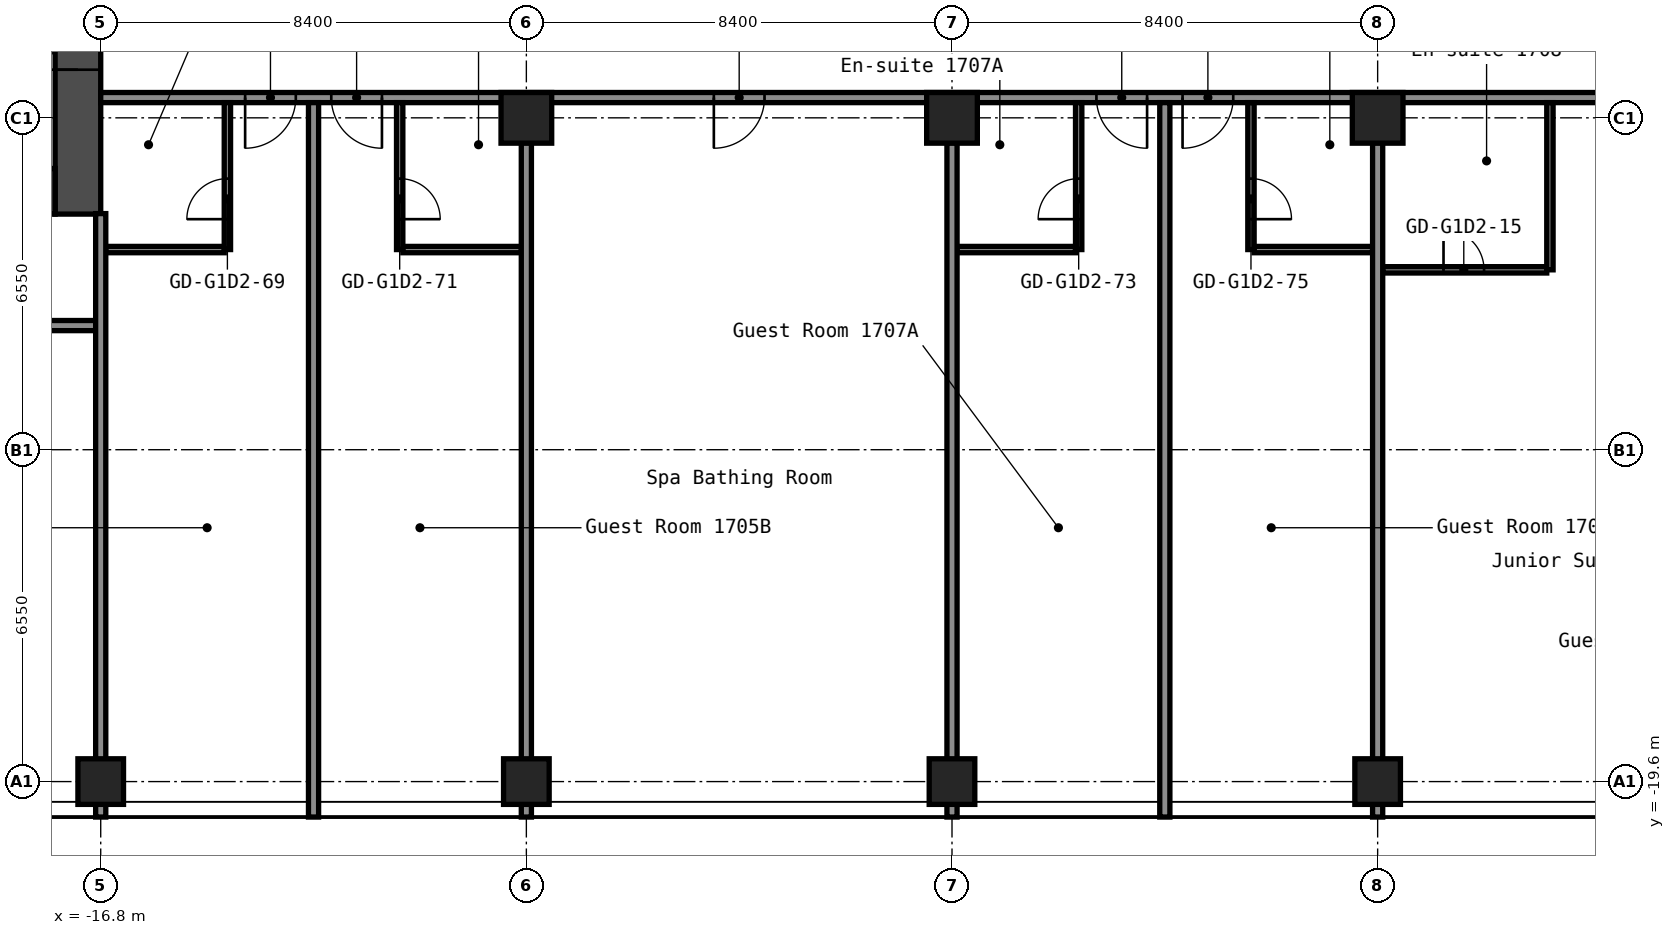
"""IFC4 building model, lengths in metres.
Left out: names, types, materials, properties, quantities, classifications, styles, units other than length and angle.
Written with IfcOpenShell. Run it as: python <this file> out.ifc"""

import sys

from ifc_helpers import new_model, si_unit, direction, frame, frame_2d, origin, origin_2d, place, context, subcontext, project, spatial, rectangle, hollow_rectangle, extrude, element, fill, save


model = new_model("IFC4")
c1 = context("Model", 3, precision=1e-05, world=origin(), true_north=direction((0.0, 1.0)))
c2 = subcontext(c1, "Body", "Model", "MODEL_VIEW")
j1 = project(units=[si_unit("LENGTHUNIT", "METRE"), si_unit("PLANEANGLEUNIT", "RADIAN")], contexts=[c1])
p1 = place(None, origin())
s1 = spatial("IfcSite", under=j1, at=p1, CompositionType="ELEMENT")
p2 = place(p1, origin())
s2 = spatial("IfcBuilding", under=s1, at=p2, CompositionType="ELEMENT")
p3 = place(p2, frame((0.0, 0.0, 61.4)))
s3 = spatial("IfcBuildingStorey", under=s2, at=p3, CompositionType="ELEMENT", Elevation=61.4)
for number, where, z_axis, x_axis in (
    (1, (-16.8, -19.6, 0.0), (0.0, 0.0, 1.0), (1.0, 0.0, 0.0)),
    (2, (-8.4, -19.6, 0.0), (0.0, 0.0, 1.0), (1.0, 0.0, 0.0)),
):
    element("IfcColumn", number, at=place(p3, frame(where, z_axis=z_axis, x_axis=x_axis)), inside=s3, PredefinedType="COLUMN", context=c2, shape_type="SweptSolid", body=[
        extrude(hollow_rectangle(XDim=0.9, YDim=0.9, WallThickness=0.036, at=origin_2d()), origin(), (0.0, 0.0, 1.0), 2.9),
    ])
p4 = place(p3, frame((-8.4, -6.5, 0.0), z_axis=(0.0, 0.0, 1.0), x_axis=(1.0, 0.0, 0.0)))
e3 = element("IfcColumn", 3, at=p4, inside=s3, PredefinedType="COLUMN", context=c2, shape_type="SweptSolid", body=[
    extrude(hollow_rectangle(XDim=1.0, YDim=1.0, WallThickness=0.04, at=origin_2d()), origin(), (0.0, 0.0, 1.0), 2.9),
])
p5 = place(p3, frame((0.0, -19.6, 0.0), z_axis=(0.0, 0.0, 1.0), x_axis=(1.0, 0.0, 0.0)))
e4 = element("IfcColumn", 4, at=p5, inside=s3, PredefinedType="COLUMN", context=c2, shape_type="SweptSolid", body=[
    extrude(hollow_rectangle(XDim=0.9, YDim=0.9, WallThickness=0.036, at=origin_2d()), origin(), (0.0, 0.0, 1.0), 2.9),
])
p6 = place(p3, frame((0.0, -6.5, 0.0), z_axis=(0.0, 0.0, 1.0), x_axis=(1.0, 0.0, 0.0)))
e5 = element("IfcColumn", 5, at=p6, inside=s3, PredefinedType="COLUMN", context=c2, shape_type="SweptSolid", body=[
    extrude(hollow_rectangle(XDim=1.0, YDim=1.0, WallThickness=0.04, at=origin_2d()), origin(), (0.0, 0.0, 1.0), 2.9),
])
p7 = place(p3, frame((8.4, -19.6, 0.0), z_axis=(0.0, 0.0, 1.0), x_axis=(1.0, 0.0, 0.0)))
e6 = element("IfcColumn", 6, at=p7, inside=s3, PredefinedType="COLUMN", context=c2, shape_type="SweptSolid", body=[
    extrude(hollow_rectangle(XDim=0.9, YDim=0.9, WallThickness=0.036, at=origin_2d()), origin(), (0.0, 0.0, 1.0), 2.9),
])
p8 = place(p3, frame((8.4, -6.5, 0.0), z_axis=(0.0, 0.0, 1.0), x_axis=(1.0, 0.0, 0.0)))
e7 = element("IfcColumn", 7, at=p8, inside=s3, PredefinedType="COLUMN", context=c2, shape_type="SweptSolid", body=[
    extrude(hollow_rectangle(XDim=1.0, YDim=1.0, WallThickness=0.04, at=origin_2d()), origin(), (0.0, 0.0, 1.0), 2.9),
])
p9 = place(p3, frame((-17.25, -8.4, 0.0), z_axis=(0.0, 0.0, 1.0), x_axis=(0.0, 1.0, 0.0)))
e8 = element("IfcWall", 8, at=p9, inside=s3, PredefinedType="SHEAR", context=c2, shape_type="SweptSolid", body=[
    extrude(rectangle(XDim=16.8, YDim=0.9, at=frame_2d((8.4, 0.0))), origin(), (0.0, 0.0, 1.0), 2.9),
])
p10 = place(p9, frame((12.75, 0.0, 0.0)))
e9 = element("IfcOpeningElement", 9, at=p10, cuts=e8, PredefinedType="OPENING", context=c2, shape_type="SweptSolid", body=[
    extrude(rectangle(XDim=1.2, YDim=2.1, at=frame_2d((0.6, 1.05))), frame((0.0, 0.46, 0.0), z_axis=(0.0, -1.0, 0.0), x_axis=(1.0, 0.0, 0.0)), (0.0, 0.0, 1.0), 0.92),
])
p11 = place(p9, frame((2.85, 0.0, 0.0)))
e10 = element("IfcOpeningElement", 10, at=p11, cuts=e8, PredefinedType="OPENING", context=c2, shape_type="SweptSolid", body=[
    extrude(rectangle(XDim=1.2, YDim=2.1, at=frame_2d((0.6, 1.05))), frame((0.0, 0.46, 0.0), z_axis=(0.0, -1.0, 0.0), x_axis=(1.0, 0.0, 0.0)), (0.0, 0.0, 1.0), 0.92),
])
p12 = place(p3, frame((-32.7, -7.95, 0.0), z_axis=(0.0, 0.0, 1.0), x_axis=(1.0, 0.0, 0.0)))
e11 = element("IfcWall", 11, at=p12, inside=s3, PredefinedType="SHEAR", context=c2, shape_type="SweptSolid", body=[
    extrude(rectangle(XDim=15.0, YDim=0.9, at=frame_2d((7.5, 0.0))), origin(), (0.0, 0.0, 1.0), 2.9),
])
p13 = place(p12, frame((11.45, 0.0, 0.0)))
e12 = element("IfcOpeningElement", 12, at=p13, cuts=e11, PredefinedType="OPENING", context=c2, shape_type="SweptSolid", body=[
    extrude(rectangle(XDim=1.0, YDim=2.1, at=frame_2d((0.5, 1.05))), frame((0.0, 0.46, 0.0), z_axis=(0.0, -1.0, 0.0), x_axis=(1.0, 0.0, 0.0)), (0.0, 0.0, 1.0), 0.92),
])
p14 = place(p3, frame((-51.1, -10.6, 0.0), z_axis=(0.0, 0.0, 1.0), x_axis=(1.0, 0.0, 0.0)))
e13 = element("IfcWall", 13, at=p14, inside=s3, PredefinedType="PARTITIONING", context=c2, shape_type="SweptSolid", body=[
    extrude(rectangle(XDim=34.3, YDim=0.2, at=frame_2d((17.15, 0.0))), origin(), (0.0, 0.0, 1.0), 2.9),
])
p15 = place(p14, frame((3.25, 0.0, 0.0)))
e14 = element("IfcOpeningElement", 14, at=p15, cuts=e13, PredefinedType="OPENING", context=c2, shape_type="SweptSolid", body=[
    extrude(rectangle(XDim=1.0, YDim=2.1, at=frame_2d((0.5, 1.05))), frame((0.0, 0.11, 0.0), z_axis=(0.0, -1.0, 0.0), x_axis=(1.0, 0.0, 0.0)), (0.0, 0.0, 1.0), 0.22),
])
p16 = place(p14, frame((5.15, 0.0, 0.0)))
e15 = element("IfcOpeningElement", 15, at=p16, cuts=e13, PredefinedType="OPENING", context=c2, shape_type="SweptSolid", body=[
    extrude(rectangle(XDim=1.0, YDim=2.1, at=frame_2d((0.5, 1.05))), frame((0.0, 0.11, 0.0), z_axis=(0.0, -1.0, 0.0), x_axis=(1.0, 0.0, 0.0)), (0.0, 0.0, 1.0), 0.22),
])
p17 = place(p14, frame((11.1, 0.0, 0.0)))
e16 = element("IfcOpeningElement", 16, at=p17, cuts=e13, PredefinedType="OPENING", context=c2, shape_type="SweptSolid", body=[
    extrude(rectangle(XDim=1.0, YDim=2.1, at=frame_2d((0.5, 1.05))), frame((0.0, 0.11, 0.0), z_axis=(0.0, -1.0, 0.0), x_axis=(1.0, 0.0, 0.0)), (0.0, 0.0, 1.0), 0.22),
])
p18 = place(p14, frame((20.35, 0.0, 0.0)))
e17 = element("IfcOpeningElement", 17, at=p18, cuts=e13, PredefinedType="OPENING", context=c2, shape_type="SweptSolid", body=[
    extrude(rectangle(XDim=1.0, YDim=2.1, at=frame_2d((0.5, 1.05))), frame((0.0, 0.11, 0.0), z_axis=(0.0, -1.0, 0.0), x_axis=(1.0, 0.0, 0.0)), (0.0, 0.0, 1.0), 0.22),
])
p19 = place(p14, frame((22.05, 0.0, 0.0)))
e18 = element("IfcOpeningElement", 18, at=p19, cuts=e13, PredefinedType="OPENING", context=c2, shape_type="SweptSolid", body=[
    extrude(rectangle(XDim=1.0, YDim=2.1, at=frame_2d((0.5, 1.05))), frame((0.0, 0.11, 0.0), z_axis=(0.0, -1.0, 0.0), x_axis=(1.0, 0.0, 0.0)), (0.0, 0.0, 1.0), 0.22),
])
p20 = place(p14, frame((31.3, 0.0, 0.0)))
e19 = element("IfcOpeningElement", 19, at=p20, cuts=e13, PredefinedType="OPENING", context=c2, shape_type="SweptSolid", body=[
    extrude(rectangle(XDim=1.0, YDim=2.1, at=frame_2d((0.5, 1.05))), frame((0.0, 0.11, 0.0), z_axis=(0.0, -1.0, 0.0), x_axis=(1.0, 0.0, 0.0)), (0.0, 0.0, 1.0), 0.22),
])
p21 = place(p3, frame((8.5, -9.5, 0.0), z_axis=(0.0, 0.0, 1.0), x_axis=(1.0, 0.0, 0.0)))
e20 = element("IfcWall", 20, at=p21, inside=s3, PredefinedType="PARTITIONING", context=c2, shape_type="SweptSolid", body=[
    extrude(rectangle(XDim=3.238, YDim=0.125, at=frame_2d((1.619, 0.0))), origin(), (0.0, 0.0, 1.0), 2.9),
])
p22 = place(p21, frame((1.2, 0.0, 0.0)))
e21 = element("IfcOpeningElement", 21, at=p22, cuts=e20, PredefinedType="OPENING", context=c2, shape_type="SweptSolid", body=[
    extrude(rectangle(XDim=0.8, YDim=2.1, at=frame_2d((0.4, 1.05))), frame((0.0, 0.073, 0.0), z_axis=(0.0, -1.0, 0.0), x_axis=(1.0, 0.0, 0.0)), (0.0, 0.0, 1.0), 0.145),
])
for number, where, z_axis, x_axis in (
    (22, (-16.7, -9.1, 0.0), (0.0, 0.0, 1.0), (1.0, 0.0, 0.0)),
    (23, (-10.837, -9.1, 0.0), (0.0, 0.0, 1.0), (1.0, 0.0, 0.0)),
    (24, (0.1, -9.1, 0.0), (0.0, 0.0, 1.0), (1.0, 0.0, 0.0)),
):
    element("IfcWall", number, at=place(p3, frame(where, z_axis=z_axis, x_axis=x_axis)), inside=s3, PredefinedType="PARTITIONING", context=c2, shape_type="SweptSolid", body=[
        extrude(rectangle(XDim=2.337, YDim=0.125, at=frame_2d((1.169, 0.0))), origin(), (0.0, 0.0, 1.0), 2.9),
    ])
p23 = place(p3, frame((5.962, -9.1, 0.0), z_axis=(0.0, 0.0, 1.0), x_axis=(1.0, 0.0, 0.0)))
e25 = element("IfcWall", 25, at=p23, inside=s3, PredefinedType="PARTITIONING", context=c2, shape_type="SweptSolid", body=[
    extrude(rectangle(XDim=2.338, YDim=0.125, at=frame_2d((1.169, 0.0))), origin(), (0.0, 0.0, 1.0), 2.9),
])
p24 = place(p3, frame((-16.8, -6.1, 0.0), z_axis=(0.0, 0.0, 1.0), x_axis=(1.0, 0.0, 0.0)))
e26 = element("IfcWall", 26, at=p24, inside=s3, PredefinedType="PARTITIONING", context=c2, shape_type="SweptSolid", body=[
    extrude(rectangle(XDim=33.6, YDim=0.2, at=frame_2d((16.8, 0.0))), origin(), (0.0, 0.0, 1.0), 2.9),
])
p25 = place(p24, frame((2.85, 0.0, 0.0)))
e27 = element("IfcOpeningElement", 27, at=p25, cuts=e26, PredefinedType="OPENING", context=c2, shape_type="SweptSolid", body=[
    extrude(rectangle(XDim=1.0, YDim=2.1, at=frame_2d((0.5, 1.05))), frame((0.0, 0.11, 0.0), z_axis=(0.0, -1.0, 0.0), x_axis=(1.0, 0.0, 0.0)), (0.0, 0.0, 1.0), 0.22),
])
p26 = place(p24, frame((4.55, 0.0, 0.0)))
e28 = element("IfcOpeningElement", 28, at=p26, cuts=e26, PredefinedType="OPENING", context=c2, shape_type="SweptSolid", body=[
    extrude(rectangle(XDim=1.0, YDim=2.1, at=frame_2d((0.5, 1.05))), frame((0.0, 0.11, 0.0), z_axis=(0.0, -1.0, 0.0), x_axis=(1.0, 0.0, 0.0)), (0.0, 0.0, 1.0), 0.22),
])
p27 = place(p24, frame((12.1, 0.0, 0.0)))
e29 = element("IfcOpeningElement", 29, at=p27, cuts=e26, PredefinedType="OPENING", context=c2, shape_type="SweptSolid", body=[
    extrude(rectangle(XDim=1.0, YDim=2.1, at=frame_2d((0.5, 1.05))), frame((0.0, 0.11, 0.0), z_axis=(0.0, -1.0, 0.0), x_axis=(1.0, 0.0, 0.0)), (0.0, 0.0, 1.0), 0.22),
])
p28 = place(p24, frame((19.65, 0.0, 0.0)))
e30 = element("IfcOpeningElement", 30, at=p28, cuts=e26, PredefinedType="OPENING", context=c2, shape_type="SweptSolid", body=[
    extrude(rectangle(XDim=1.0, YDim=2.1, at=frame_2d((0.5, 1.05))), frame((0.0, 0.11, 0.0), z_axis=(0.0, -1.0, 0.0), x_axis=(1.0, 0.0, 0.0)), (0.0, 0.0, 1.0), 0.22),
])
p29 = place(p24, frame((21.35, 0.0, 0.0)))
e31 = element("IfcOpeningElement", 31, at=p29, cuts=e26, PredefinedType="OPENING", context=c2, shape_type="SweptSolid", body=[
    extrude(rectangle(XDim=1.0, YDim=2.1, at=frame_2d((0.5, 1.05))), frame((0.0, 0.11, 0.0), z_axis=(0.0, -1.0, 0.0), x_axis=(1.0, 0.0, 0.0)), (0.0, 0.0, 1.0), 0.22),
])
p30 = place(p24, frame((30.6, 0.0, 0.0)))
e32 = element("IfcOpeningElement", 32, at=p30, cuts=e26, PredefinedType="OPENING", context=c2, shape_type="SweptSolid", body=[
    extrude(rectangle(XDim=1.0, YDim=2.1, at=frame_2d((0.5, 1.05))), frame((0.0, 0.11, 0.0), z_axis=(0.0, -1.0, 0.0), x_axis=(1.0, 0.0, 0.0)), (0.0, 0.0, 1.0), 0.22),
])
p31 = place(p3, frame((-16.8, -20.3, 0.0), z_axis=(0.0, 0.0, 1.0), x_axis=(0.0, 1.0, 0.0)))
e33 = element("IfcWall", 33, at=p31, inside=s3, PredefinedType="PARTITIONING", context=c2, shape_type="SweptSolid", body=[
    extrude(rectangle(XDim=11.91, YDim=0.2, at=frame_2d((5.955, 0.0))), origin(), (0.0, 0.0, 1.0), 2.9),
])
p32 = place(p3, frame((-14.3, -9.1, 0.0), z_axis=(0.0, 0.0, 1.0), x_axis=(0.0, 1.0, 0.0)))
e34 = element("IfcWall", 34, at=p32, inside=s3, PredefinedType="PARTITIONING", context=c2, shape_type="SweptSolid", body=[
    extrude(rectangle(XDim=2.9, YDim=0.125, at=frame_2d((1.45, 0.0))), origin(), (0.0, 0.0, 1.0), 2.9),
])
p33 = place(p32, frame((0.6, 0.0, 0.0)))
e35 = element("IfcOpeningElement", 35, at=p33, cuts=e34, PredefinedType="OPENING", context=c2, shape_type="SweptSolid", body=[
    extrude(rectangle(XDim=0.8, YDim=2.1, at=frame_2d((0.4, 1.05))), frame((0.0, 0.073, 0.0), z_axis=(0.0, -1.0, 0.0), x_axis=(1.0, 0.0, 0.0)), (0.0, 0.0, 1.0), 0.145),
])
p34 = place(p3, frame((-12.6, -20.3, 0.0), z_axis=(0.0, 0.0, 1.0), x_axis=(0.0, 1.0, 0.0)))
e36 = element("IfcWall", 36, at=p34, inside=s3, PredefinedType="PARTITIONING", context=c2, shape_type="SweptSolid", body=[
    extrude(rectangle(XDim=14.1, YDim=0.2, at=frame_2d((7.05, 0.0))), origin(), (0.0, 0.0, 1.0), 2.9),
])
p35 = place(p3, frame((-10.9, -9.1, 0.0), z_axis=(0.0, 0.0, 1.0), x_axis=(0.0, 1.0, 0.0)))
e37 = element("IfcWall", 37, at=p35, inside=s3, PredefinedType="PARTITIONING", context=c2, shape_type="SweptSolid", body=[
    extrude(rectangle(XDim=2.9, YDim=0.125, at=frame_2d((1.45, 0.0))), origin(), (0.0, 0.0, 1.0), 2.9),
])
p36 = place(p35, frame((0.6, 0.0, 0.0)))
e38 = element("IfcOpeningElement", 38, at=p36, cuts=e37, PredefinedType="OPENING", context=c2, shape_type="SweptSolid", body=[
    extrude(rectangle(XDim=0.8, YDim=2.1, at=frame_2d((0.4, 1.05))), frame((0.0, 0.073, 0.0), z_axis=(0.0, -1.0, 0.0), x_axis=(1.0, 0.0, 0.0)), (0.0, 0.0, 1.0), 0.145),
])
for number, where, z_axis, x_axis in (
    (39, (-8.4, -20.3, 0.0), (0.0, 0.0, 1.0), (0.0, 1.0, 0.0)),
    (40, (0.0, -20.3, 0.0), (0.0, 0.0, 1.0), (0.0, 1.0, 0.0)),
):
    element("IfcWall", number, at=place(p3, frame(where, z_axis=z_axis, x_axis=x_axis)), inside=s3, PredefinedType="PARTITIONING", context=c2, shape_type="SweptSolid", body=[
        extrude(rectangle(XDim=13.31, YDim=0.2, at=frame_2d((6.655, 0.0))), origin(), (0.0, 0.0, 1.0), 2.9),
    ])
p37 = place(p3, frame((2.5, -9.1, 0.0), z_axis=(0.0, 0.0, 1.0), x_axis=(0.0, 1.0, 0.0)))
e41 = element("IfcWall", 41, at=p37, inside=s3, PredefinedType="PARTITIONING", context=c2, shape_type="SweptSolid", body=[
    extrude(rectangle(XDim=2.9, YDim=0.125, at=frame_2d((1.45, 0.0))), origin(), (0.0, 0.0, 1.0), 2.9),
])
p38 = place(p37, frame((0.6, 0.0, 0.0)))
e42 = element("IfcOpeningElement", 42, at=p38, cuts=e41, PredefinedType="OPENING", context=c2, shape_type="SweptSolid", body=[
    extrude(rectangle(XDim=0.8, YDim=2.1, at=frame_2d((0.4, 1.05))), frame((0.0, 0.073, 0.0), z_axis=(0.0, -1.0, 0.0), x_axis=(1.0, 0.0, 0.0)), (0.0, 0.0, 1.0), 0.145),
])
p39 = place(p3, frame((4.2, -20.3, 0.0), z_axis=(0.0, 0.0, 1.0), x_axis=(0.0, 1.0, 0.0)))
e43 = element("IfcWall", 43, at=p39, inside=s3, PredefinedType="PARTITIONING", context=c2, shape_type="SweptSolid", body=[
    extrude(rectangle(XDim=14.1, YDim=0.2, at=frame_2d((7.05, 0.0))), origin(), (0.0, 0.0, 1.0), 2.9),
])
p40 = place(p3, frame((5.9, -9.1, 0.0), z_axis=(0.0, 0.0, 1.0), x_axis=(0.0, 1.0, 0.0)))
e44 = element("IfcWall", 44, at=p40, inside=s3, PredefinedType="PARTITIONING", context=c2, shape_type="SweptSolid", body=[
    extrude(rectangle(XDim=2.9, YDim=0.125, at=frame_2d((1.45, 0.0))), origin(), (0.0, 0.0, 1.0), 2.9),
])
p41 = place(p40, frame((0.6, 0.0, 0.0)))
e45 = element("IfcOpeningElement", 45, at=p41, cuts=e44, PredefinedType="OPENING", context=c2, shape_type="SweptSolid", body=[
    extrude(rectangle(XDim=0.8, YDim=2.1, at=frame_2d((0.4, 1.05))), frame((0.0, 0.073, 0.0), z_axis=(0.0, -1.0, 0.0), x_axis=(1.0, 0.0, 0.0)), (0.0, 0.0, 1.0), 0.145),
])
p42 = place(p3, frame((8.4, -20.3, 0.0), z_axis=(0.0, 0.0, 1.0), x_axis=(0.0, 1.0, 0.0)))
e46 = element("IfcWall", 46, at=p42, inside=s3, PredefinedType="PARTITIONING", context=c2, shape_type="SweptSolid", body=[
    extrude(rectangle(XDim=13.31, YDim=0.2, at=frame_2d((6.655, 0.0))), origin(), (0.0, 0.0, 1.0), 2.9),
])
p43 = place(p3, frame((11.8, -9.5, 0.0), z_axis=(0.0, 0.0, 1.0), x_axis=(0.0, 1.0, 0.0)))
e47 = element("IfcWall", 47, at=p43, inside=s3, PredefinedType="PARTITIONING", context=c2, shape_type="SweptSolid", body=[
    extrude(rectangle(XDim=3.3, YDim=0.125, at=frame_2d((1.65, 0.0))), origin(), (0.0, 0.0, 1.0), 2.9),
])
p44 = place(p11, origin())
e48 = element("IfcDoor", 48, at=p44, inside=s3, OperationType="DOUBLE_DOOR_SINGLE_SWING", PredefinedType="DOOR", context=c2, shape_type="SweptSolid", body=[
    extrude(rectangle(XDim=1.2, YDim=2.1, at=frame_2d((0.6, 1.05))), frame((0.0, 0.025, 0.0), z_axis=(0.0, -1.0, 0.0), x_axis=(1.0, 0.0, 0.0)), (0.0, 0.0, 1.0), 0.05),
])
fill(e10, e48)
p45 = place(p22, origin())
e49 = element("IfcDoor", 49, at=p45, inside=s3, OperationType="SINGLE_SWING_RIGHT", PredefinedType="DOOR", context=c2, shape_type="SweptSolid", body=[
    extrude(rectangle(XDim=0.8, YDim=2.1, at=frame_2d((0.4, 1.05))), frame((0.0, 0.025, 0.0), z_axis=(0.0, -1.0, 0.0), x_axis=(1.0, 0.0, 0.0)), (0.0, 0.0, 1.0), 0.05),
])
fill(e21, e49)
p46 = place(p25, origin())
e50 = element("IfcDoor", 50, at=p46, inside=s3, OperationType="SINGLE_SWING_LEFT", PredefinedType="DOOR", context=c2, shape_type="SweptSolid", body=[
    extrude(rectangle(XDim=1.0, YDim=2.1, at=frame_2d((0.5, 1.05))), frame((0.0, 0.025, 0.0), z_axis=(0.0, -1.0, 0.0), x_axis=(1.0, 0.0, 0.0)), (0.0, 0.0, 1.0), 0.05),
])
fill(e27, e50)
p47 = place(p26, origin())
e51 = element("IfcDoor", 51, at=p47, inside=s3, OperationType="SINGLE_SWING_RIGHT", PredefinedType="DOOR", context=c2, shape_type="SweptSolid", body=[
    extrude(rectangle(XDim=1.0, YDim=2.1, at=frame_2d((0.5, 1.05))), frame((0.0, 0.025, 0.0), z_axis=(0.0, -1.0, 0.0), x_axis=(1.0, 0.0, 0.0)), (0.0, 0.0, 1.0), 0.05),
])
fill(e28, e51)
p48 = place(p27, origin())
e52 = element("IfcDoor", 52, at=p48, inside=s3, OperationType="SINGLE_SWING_LEFT", PredefinedType="DOOR", context=c2, shape_type="SweptSolid", body=[
    extrude(rectangle(XDim=1.0, YDim=2.1, at=frame_2d((0.5, 1.05))), frame((0.0, 0.025, 0.0), z_axis=(0.0, -1.0, 0.0), x_axis=(1.0, 0.0, 0.0)), (0.0, 0.0, 1.0), 0.05),
])
fill(e29, e52)
p49 = place(p28, origin())
e53 = element("IfcDoor", 53, at=p49, inside=s3, OperationType="SINGLE_SWING_RIGHT", PredefinedType="DOOR", context=c2, shape_type="SweptSolid", body=[
    extrude(rectangle(XDim=1.0, YDim=2.1, at=frame_2d((0.5, 1.05))), frame((0.0, 0.025, 0.0), z_axis=(0.0, -1.0, 0.0), x_axis=(1.0, 0.0, 0.0)), (0.0, 0.0, 1.0), 0.05),
])
fill(e30, e53)
p50 = place(p29, origin())
e54 = element("IfcDoor", 54, at=p50, inside=s3, OperationType="SINGLE_SWING_LEFT", PredefinedType="DOOR", context=c2, shape_type="SweptSolid", body=[
    extrude(rectangle(XDim=1.0, YDim=2.1, at=frame_2d((0.5, 1.05))), frame((0.0, 0.025, 0.0), z_axis=(0.0, -1.0, 0.0), x_axis=(1.0, 0.0, 0.0)), (0.0, 0.0, 1.0), 0.05),
])
fill(e31, e54)
p51 = place(p33, origin())
e55 = element("IfcDoor", 55, at=p51, inside=s3, OperationType="SINGLE_SWING_RIGHT", PredefinedType="DOOR", context=c2, shape_type="SweptSolid", body=[
    extrude(rectangle(XDim=0.8, YDim=2.1, at=frame_2d((0.4, 1.05))), frame((0.0, 0.025, 0.0), z_axis=(0.0, -1.0, 0.0), x_axis=(1.0, 0.0, 0.0)), (0.0, 0.0, 1.0), 0.05),
])
fill(e35, e55)
p52 = place(p36, origin())
e56 = element("IfcDoor", 56, at=p52, inside=s3, OperationType="SINGLE_SWING_LEFT", PredefinedType="DOOR", context=c2, shape_type="SweptSolid", body=[
    extrude(rectangle(XDim=0.8, YDim=2.1, at=frame_2d((0.4, 1.05))), frame((0.0, 0.025, 0.0), z_axis=(0.0, -1.0, 0.0), x_axis=(1.0, 0.0, 0.0)), (0.0, 0.0, 1.0), 0.05),
])
fill(e38, e56)
p53 = place(p38, origin())
e57 = element("IfcDoor", 57, at=p53, inside=s3, OperationType="SINGLE_SWING_RIGHT", PredefinedType="DOOR", context=c2, shape_type="SweptSolid", body=[
    extrude(rectangle(XDim=0.8, YDim=2.1, at=frame_2d((0.4, 1.05))), frame((0.0, 0.025, 0.0), z_axis=(0.0, -1.0, 0.0), x_axis=(1.0, 0.0, 0.0)), (0.0, 0.0, 1.0), 0.05),
])
fill(e42, e57)
p54 = place(p41, origin())
e58 = element("IfcDoor", 58, at=p54, inside=s3, OperationType="SINGLE_SWING_LEFT", PredefinedType="DOOR", context=c2, shape_type="SweptSolid", body=[
    extrude(rectangle(XDim=0.8, YDim=2.1, at=frame_2d((0.4, 1.05))), frame((0.0, 0.025, 0.0), z_axis=(0.0, -1.0, 0.0), x_axis=(1.0, 0.0, 0.0)), (0.0, 0.0, 1.0), 0.05),
])
fill(e45, e58)
save(model, sys.argv[1])
